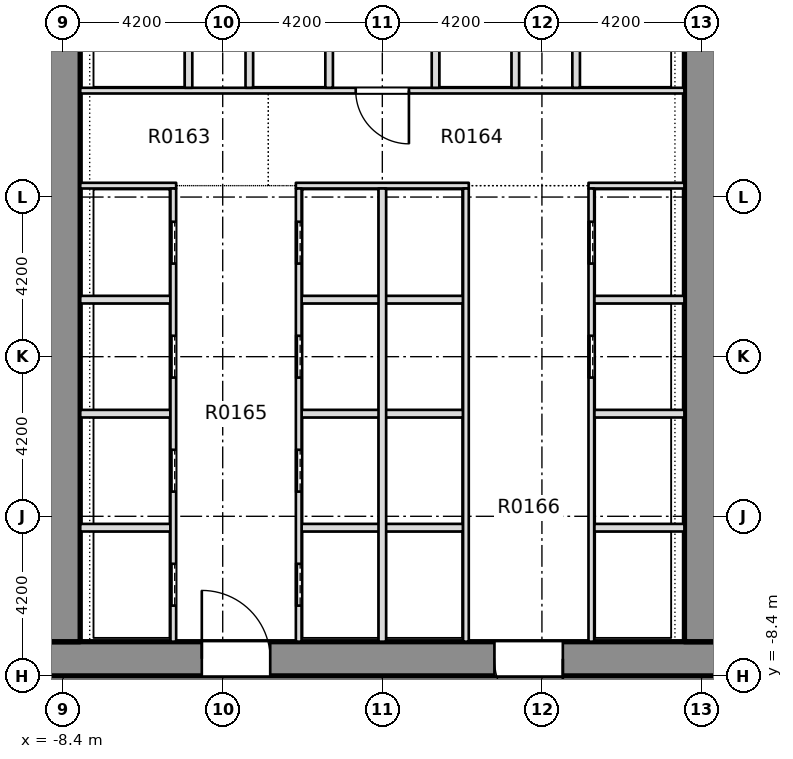
"""IFC4 building model, lengths in metres.
Left out: names, types, materials, properties, quantities, classifications, styles, units other than length and angle.
Written with IfcOpenShell. Run it as: python <this file> out.ifc"""

import sys

from ifc_helpers import new_model, si_unit, direction, frame, frame_2d, origin, place, context, subcontext, project, spatial, rectangle, extrude, element, fill, save


model = new_model("IFC4")
c1 = context("Model", 3, precision=1e-05, world=origin(), true_north=direction((0.0, 1.0)))
c2 = subcontext(c1, "Body", "Model", "MODEL_VIEW")
j1 = project(units=[si_unit("LENGTHUNIT", "METRE"), si_unit("PLANEANGLEUNIT", "RADIAN")], contexts=[c1])
p1 = place(None, origin())
s1 = spatial("IfcSite", under=j1, at=p1, CompositionType="ELEMENT")
p2 = place(p1, origin())
s2 = spatial("IfcBuilding", under=s1, at=p2, CompositionType="ELEMENT")
p3 = place(p2, frame((0.0, 0.0, 7.5)))
s3 = spatial("IfcBuildingStorey", under=s2, at=p3, CompositionType="ELEMENT", Elevation=7.5)
p4 = place(p3, frame((-11.7, -7.95, -0.4), z_axis=(0.0, 0.0, 1.0), x_axis=(1.0, 0.0, 0.0)))
e1 = element("IfcWall", 1, at=p4, inside=s3, PredefinedType="SHEAR", context=c2, shape_type="SweptSolid", body=[
    extrude(rectangle(XDim=23.4, YDim=0.9, at=frame_2d((11.7, 0.0))), origin(), (0.0, 0.0, 1.0), 5.0),
])
p5 = place(p4, frame((6.95, 0.0, 0.4)))
e2 = element("IfcOpeningElement", 2, at=p5, cuts=e1, PredefinedType="OPENING", context=c2, shape_type="SweptSolid", body=[
    extrude(rectangle(XDim=1.8, YDim=2.1, at=frame_2d((0.9, 1.05))), frame((0.0, 0.46, 0.0), z_axis=(0.0, -1.0, 0.0), x_axis=(1.0, 0.0, 0.0)), (0.0, 0.0, 1.0), 0.92),
])
p6 = place(p4, frame((14.65, 0.0, 0.4)))
e3 = element("IfcOpeningElement", 3, at=p6, cuts=e1, PredefinedType="OPENING", context=c2, shape_type="SweptSolid", body=[
    extrude(rectangle(XDim=1.8, YDim=2.1, at=frame_2d((0.9, 1.05))), frame((0.0, 0.46, 0.0), z_axis=(0.0, -1.0, 0.0), x_axis=(1.0, 0.0, 0.0)), (0.0, 0.0, 1.0), 0.92),
])
p7 = place(p3, frame((-8.4, -7.5, -0.4), z_axis=(0.0, 0.0, 1.0), x_axis=(0.0, 1.0, 0.0)))
e4 = element("IfcWall", 4, at=p7, inside=s3, PredefinedType="SHEAR", context=c2, shape_type="SweptSolid", body=[
    extrude(rectangle(XDim=28.35, YDim=0.9, at=frame_2d((14.175, 0.0))), origin(), (0.0, 0.0, 1.0), 5.0),
])
p8 = place(p7, frame((18.4, 0.0, 0.4)))
e5 = element("IfcOpeningElement", 5, at=p8, cuts=e4, PredefinedType="OPENING", context=c2, shape_type="SweptSolid", body=[
    extrude(rectangle(XDim=1.2, YDim=2.1, at=frame_2d((0.6, 1.05))), frame((0.0, 0.46, 0.0), z_axis=(0.0, -1.0, 0.0), x_axis=(1.0, 0.0, 0.0)), (0.0, 0.0, 1.0), 0.92),
])
p9 = place(p3, frame((8.4, -7.5, -0.4), z_axis=(0.0, 0.0, 1.0), x_axis=(0.0, 1.0, 0.0)))
e6 = element("IfcWall", 6, at=p9, inside=s3, PredefinedType="SHEAR", context=c2, shape_type="SweptSolid", body=[
    extrude(rectangle(XDim=28.35, YDim=0.9, at=frame_2d((14.175, 0.0))), origin(), (0.0, 0.0, 1.0), 5.0),
])
p10 = place(p9, frame((18.4, 0.0, 0.4)))
e7 = element("IfcOpeningElement", 7, at=p10, cuts=e6, PredefinedType="OPENING", context=c2, shape_type="SweptSolid", body=[
    extrude(rectangle(XDim=1.2, YDim=2.1, at=frame_2d((0.6, 1.05))), frame((0.0, 0.46, 0.0), z_axis=(0.0, -1.0, 0.0), x_axis=(1.0, 0.0, 0.0)), (0.0, 0.0, 1.0), 0.92),
])
p11 = place(p3, frame((-7.949, -4.5, 0.0), z_axis=(0.0, 0.0, 1.0), x_axis=(1.0, 0.0, 0.0)))
e8 = element("IfcWall", 8, at=p11, inside=s3, PredefinedType="PARTITIONING", context=c2, shape_type="SweptSolid", body=[
    extrude(rectangle(XDim=2.374, YDim=0.2, at=frame_2d((1.187, 0.0))), origin(), (0.0, 0.0, 1.0), 4.6),
])
p12 = place(p3, frame((-2.125, -4.5, 0.0), z_axis=(0.0, 0.0, 1.0), x_axis=(1.0, 0.0, 0.0)))
e9 = element("IfcWall", 9, at=p12, inside=s3, PredefinedType="PARTITIONING", context=c2, shape_type="SweptSolid", body=[
    extrude(rectangle(XDim=4.25, YDim=0.2, at=frame_2d((2.125, 0.0))), origin(), (0.0, 0.0, 1.0), 4.6),
])
for number, where, z_axis, x_axis in (
    (10, (5.575, -4.5, 0.0), (0.0, 0.0, 1.0), (1.0, 0.0, 0.0)),
    (11, (-7.949, -1.5, 0.0), (0.0, 0.0, 1.0), (1.0, 0.0, 0.0)),
):
    element("IfcWall", number, at=place(p3, frame(where, z_axis=z_axis, x_axis=x_axis)), inside=s3, PredefinedType="PARTITIONING", context=c2, shape_type="SweptSolid", body=[
        extrude(rectangle(XDim=2.374, YDim=0.2, at=frame_2d((1.187, 0.0))), origin(), (0.0, 0.0, 1.0), 4.6),
    ])
p13 = place(p3, frame((-2.125, -1.5, 0.0), z_axis=(0.0, 0.0, 1.0), x_axis=(1.0, 0.0, 0.0)))
e12 = element("IfcWall", 12, at=p13, inside=s3, PredefinedType="PARTITIONING", context=c2, shape_type="SweptSolid", body=[
    extrude(rectangle(XDim=4.25, YDim=0.2, at=frame_2d((2.125, 0.0))), origin(), (0.0, 0.0, 1.0), 4.6),
])
for number, where, z_axis, x_axis in (
    (13, (5.575, -1.5, 0.0), (0.0, 0.0, 1.0), (1.0, 0.0, 0.0)),
    (14, (-7.949, 1.5, 0.0), (0.0, 0.0, 1.0), (1.0, 0.0, 0.0)),
):
    element("IfcWall", number, at=place(p3, frame(where, z_axis=z_axis, x_axis=x_axis)), inside=s3, PredefinedType="PARTITIONING", context=c2, shape_type="SweptSolid", body=[
        extrude(rectangle(XDim=2.374, YDim=0.2, at=frame_2d((1.187, 0.0))), origin(), (0.0, 0.0, 1.0), 4.6),
    ])
p14 = place(p3, frame((-2.125, 1.5, 0.0), z_axis=(0.0, 0.0, 1.0), x_axis=(1.0, 0.0, 0.0)))
e15 = element("IfcWall", 15, at=p14, inside=s3, PredefinedType="PARTITIONING", context=c2, shape_type="SweptSolid", body=[
    extrude(rectangle(XDim=4.25, YDim=0.2, at=frame_2d((2.125, 0.0))), origin(), (0.0, 0.0, 1.0), 4.6),
])
p15 = place(p3, frame((5.575, 1.5, 0.0), z_axis=(0.0, 0.0, 1.0), x_axis=(1.0, 0.0, 0.0)))
e16 = element("IfcWall", 16, at=p15, inside=s3, PredefinedType="PARTITIONING", context=c2, shape_type="SweptSolid", body=[
    extrude(rectangle(XDim=2.374, YDim=0.2, at=frame_2d((1.187, 0.0))), origin(), (0.0, 0.0, 1.0), 4.6),
])
p16 = place(p3, frame((-7.949, 4.5, 0.0), z_axis=(0.0, 0.0, 1.0), x_axis=(1.0, 0.0, 0.0)))
e17 = element("IfcWall", 17, at=p16, inside=s3, PredefinedType="PARTITIONING", context=c2, shape_type="SweptSolid", body=[
    extrude(rectangle(XDim=2.524, YDim=0.15, at=frame_2d((1.262, 0.0))), origin(), (0.0, 0.0, 1.0), 4.6),
])
p17 = place(p3, frame((-2.275, 4.5, 0.0), z_axis=(0.0, 0.0, 1.0), x_axis=(1.0, 0.0, 0.0)))
e18 = element("IfcWall", 18, at=p17, inside=s3, PredefinedType="PARTITIONING", context=c2, shape_type="SweptSolid", body=[
    extrude(rectangle(XDim=4.55, YDim=0.15, at=frame_2d((2.275, 0.0))), origin(), (0.0, 0.0, 1.0), 4.6),
])
p18 = place(p3, frame((5.425, 4.5, 0.0), z_axis=(0.0, 0.0, 1.0), x_axis=(1.0, 0.0, 0.0)))
e19 = element("IfcWall", 19, at=p18, inside=s3, PredefinedType="PARTITIONING", context=c2, shape_type="SweptSolid", body=[
    extrude(rectangle(XDim=2.524, YDim=0.15, at=frame_2d((1.262, 0.0))), origin(), (0.0, 0.0, 1.0), 4.6),
])
p19 = place(p3, frame((-7.949, 7.0, 0.0), z_axis=(0.0, 0.0, 1.0), x_axis=(1.0, 0.0, 0.0)))
e20 = element("IfcWall", 20, at=p19, inside=s3, PredefinedType="PARTITIONING", context=c2, shape_type="SweptSolid", body=[
    extrude(rectangle(XDim=15.898, YDim=0.15, at=frame_2d((7.949, 0.0))), origin(), (0.0, 0.0, 1.0), 4.6),
])
p20 = place(p19, frame((7.249, 0.0, 0.0)))
e21 = element("IfcOpeningElement", 21, at=p20, cuts=e20, PredefinedType="OPENING", context=c2, shape_type="SweptSolid", body=[
    extrude(rectangle(XDim=1.4, YDim=2.1, at=frame_2d((0.7, 1.05))), frame((0.0, 0.085, 0.0), z_axis=(0.0, -1.0, 0.0), x_axis=(1.0, 0.0, 0.0)), (0.0, 0.0, 1.0), 0.17),
])
p21 = place(p3, frame((-5.5, -7.499, 0.0), z_axis=(0.0, 0.0, 1.0), x_axis=(0.0, 1.0, 0.0)))
e22 = element("IfcWall", 22, at=p21, inside=s3, PredefinedType="PARTITIONING", context=c2, shape_type="SweptSolid", body=[
    extrude(rectangle(XDim=11.924, YDim=0.15, at=frame_2d((5.962, 0.0))), origin(), (0.0, 0.0, 1.0), 4.6),
])
p22 = place(p21, frame((0.949, 0.0, 0.0)))
e23 = element("IfcOpeningElement", 23, at=p22, cuts=e22, PredefinedType="OPENING", context=c2, shape_type="SweptSolid", body=[
    extrude(rectangle(XDim=1.1, YDim=2.1, at=frame_2d((0.55, 1.05))), frame((0.0, 0.085, 0.0), z_axis=(0.0, -1.0, 0.0), x_axis=(1.0, 0.0, 0.0)), (0.0, 0.0, 1.0), 0.17),
])
p23 = place(p21, frame((3.949, 0.0, 0.0)))
e24 = element("IfcOpeningElement", 24, at=p23, cuts=e22, PredefinedType="OPENING", context=c2, shape_type="SweptSolid", body=[
    extrude(rectangle(XDim=1.1, YDim=2.1, at=frame_2d((0.55, 1.05))), frame((0.0, 0.085, 0.0), z_axis=(0.0, -1.0, 0.0), x_axis=(1.0, 0.0, 0.0)), (0.0, 0.0, 1.0), 0.17),
])
p24 = place(p21, frame((6.949, 0.0, 0.0)))
e25 = element("IfcOpeningElement", 25, at=p24, cuts=e22, PredefinedType="OPENING", context=c2, shape_type="SweptSolid", body=[
    extrude(rectangle(XDim=1.1, YDim=2.1, at=frame_2d((0.55, 1.05))), frame((0.0, 0.085, 0.0), z_axis=(0.0, -1.0, 0.0), x_axis=(1.0, 0.0, 0.0)), (0.0, 0.0, 1.0), 0.17),
])
p25 = place(p21, frame((9.949, 0.0, 0.0)))
e26 = element("IfcOpeningElement", 26, at=p25, cuts=e22, PredefinedType="OPENING", context=c2, shape_type="SweptSolid", body=[
    extrude(rectangle(XDim=1.1, YDim=2.1, at=frame_2d((0.55, 1.05))), frame((0.0, 0.085, 0.0), z_axis=(0.0, -1.0, 0.0), x_axis=(1.0, 0.0, 0.0)), (0.0, 0.0, 1.0), 0.17),
])
p26 = place(p3, frame((-5.1, 7.075, 0.0), z_axis=(0.0, 0.0, 1.0), x_axis=(0.0, 1.0, 0.0)))
e27 = element("IfcWall", 27, at=p26, inside=s3, PredefinedType="PARTITIONING", context=c2, shape_type="SweptSolid", body=[
    extrude(rectangle(XDim=2.725, YDim=0.2, at=frame_2d((1.363, 0.0))), origin(), (0.0, 0.0, 1.0), 4.6),
])
p27 = place(p3, frame((-3.5, 7.075, 0.0), z_axis=(0.0, 0.0, 1.0), x_axis=(0.0, 1.0, 0.0)))
e28 = element("IfcWall", 28, at=p27, inside=s3, PredefinedType="PARTITIONING", context=c2, shape_type="SweptSolid", body=[
    extrude(rectangle(XDim=2.85, YDim=0.2, at=frame_2d((1.425, 0.0))), origin(), (0.0, 0.0, 1.0), 4.6),
])
p28 = place(p3, frame((-2.2, -7.499, 0.0), z_axis=(0.0, 0.0, 1.0), x_axis=(0.0, 1.0, 0.0)))
e29 = element("IfcWall", 29, at=p28, inside=s3, PredefinedType="PARTITIONING", context=c2, shape_type="SweptSolid", body=[
    extrude(rectangle(XDim=11.924, YDim=0.15, at=frame_2d((5.962, 0.0))), origin(), (0.0, 0.0, 1.0), 4.6),
])
p29 = place(p28, frame((0.949, 0.0, 0.0)))
e30 = element("IfcOpeningElement", 30, at=p29, cuts=e29, PredefinedType="OPENING", context=c2, shape_type="SweptSolid", body=[
    extrude(rectangle(XDim=1.1, YDim=2.1, at=frame_2d((0.55, 1.05))), frame((0.0, 0.085, 0.0), z_axis=(0.0, -1.0, 0.0), x_axis=(1.0, 0.0, 0.0)), (0.0, 0.0, 1.0), 0.17),
])
p30 = place(p28, frame((3.949, 0.0, 0.0)))
e31 = element("IfcOpeningElement", 31, at=p30, cuts=e29, PredefinedType="OPENING", context=c2, shape_type="SweptSolid", body=[
    extrude(rectangle(XDim=1.1, YDim=2.1, at=frame_2d((0.55, 1.05))), frame((0.0, 0.085, 0.0), z_axis=(0.0, -1.0, 0.0), x_axis=(1.0, 0.0, 0.0)), (0.0, 0.0, 1.0), 0.17),
])
p31 = place(p28, frame((6.949, 0.0, 0.0)))
e32 = element("IfcOpeningElement", 32, at=p31, cuts=e29, PredefinedType="OPENING", context=c2, shape_type="SweptSolid", body=[
    extrude(rectangle(XDim=1.1, YDim=2.1, at=frame_2d((0.55, 1.05))), frame((0.0, 0.085, 0.0), z_axis=(0.0, -1.0, 0.0), x_axis=(1.0, 0.0, 0.0)), (0.0, 0.0, 1.0), 0.17),
])
p32 = place(p28, frame((9.949, 0.0, 0.0)))
e33 = element("IfcOpeningElement", 33, at=p32, cuts=e29, PredefinedType="OPENING", context=c2, shape_type="SweptSolid", body=[
    extrude(rectangle(XDim=1.1, YDim=2.1, at=frame_2d((0.55, 1.05))), frame((0.0, 0.085, 0.0), z_axis=(0.0, -1.0, 0.0), x_axis=(1.0, 0.0, 0.0)), (0.0, 0.0, 1.0), 0.17),
])
p33 = place(p3, frame((-1.4, 7.075, 0.0), z_axis=(0.0, 0.0, 1.0), x_axis=(0.0, 1.0, 0.0)))
e34 = element("IfcWall", 34, at=p33, inside=s3, PredefinedType="PARTITIONING", context=c2, shape_type="SweptSolid", body=[
    extrude(rectangle(XDim=2.85, YDim=0.2, at=frame_2d((1.425, 0.0))), origin(), (0.0, 0.0, 1.0), 4.6),
])
p34 = place(p3, frame((0.0, -7.499, 0.0), z_axis=(0.0, 0.0, 1.0), x_axis=(0.0, 1.0, 0.0)))
e35 = element("IfcWall", 35, at=p34, inside=s3, PredefinedType="PARTITIONING", context=c2, shape_type="SweptSolid", body=[
    extrude(rectangle(XDim=11.924, YDim=0.2, at=frame_2d((5.962, 0.0))), origin(), (0.0, 0.0, 1.0), 4.6),
])
p35 = place(p3, frame((1.4, 7.075, 0.0), z_axis=(0.0, 0.0, 1.0), x_axis=(0.0, 1.0, 0.0)))
e36 = element("IfcWall", 36, at=p35, inside=s3, PredefinedType="PARTITIONING", context=c2, shape_type="SweptSolid", body=[
    extrude(rectangle(XDim=2.85, YDim=0.2, at=frame_2d((1.425, 0.0))), origin(), (0.0, 0.0, 1.0), 4.6),
])
p36 = place(p3, frame((2.2, -7.499, 0.0), z_axis=(0.0, 0.0, 1.0), x_axis=(0.0, 1.0, 0.0)))
e37 = element("IfcWall", 37, at=p36, inside=s3, PredefinedType="PARTITIONING", context=c2, shape_type="SweptSolid", body=[
    extrude(rectangle(XDim=11.924, YDim=0.15, at=frame_2d((5.962, 0.0))), origin(), (0.0, 0.0, 1.0), 4.6),
])
p37 = place(p3, frame((3.5, 7.075, 0.0), z_axis=(0.0, 0.0, 1.0), x_axis=(0.0, 1.0, 0.0)))
e38 = element("IfcWall", 38, at=p37, inside=s3, PredefinedType="PARTITIONING", context=c2, shape_type="SweptSolid", body=[
    extrude(rectangle(XDim=2.85, YDim=0.2, at=frame_2d((1.425, 0.0))), origin(), (0.0, 0.0, 1.0), 4.6),
])
p38 = place(p3, frame((5.1, 7.075, 0.0), z_axis=(0.0, 0.0, 1.0), x_axis=(0.0, 1.0, 0.0)))
e39 = element("IfcWall", 39, at=p38, inside=s3, PredefinedType="PARTITIONING", context=c2, shape_type="SweptSolid", body=[
    extrude(rectangle(XDim=2.725, YDim=0.2, at=frame_2d((1.363, 0.0))), origin(), (0.0, 0.0, 1.0), 4.6),
])
p39 = place(p3, frame((5.5, -7.499, 0.0), z_axis=(0.0, 0.0, 1.0), x_axis=(0.0, 1.0, 0.0)))
e40 = element("IfcWall", 40, at=p39, inside=s3, PredefinedType="PARTITIONING", context=c2, shape_type="SweptSolid", body=[
    extrude(rectangle(XDim=11.924, YDim=0.15, at=frame_2d((5.962, 0.0))), origin(), (0.0, 0.0, 1.0), 4.6),
])
p40 = place(p39, frame((6.949, 0.0, 0.0)))
e41 = element("IfcOpeningElement", 41, at=p40, cuts=e40, PredefinedType="OPENING", context=c2, shape_type="SweptSolid", body=[
    extrude(rectangle(XDim=1.1, YDim=2.1, at=frame_2d((0.55, 1.05))), frame((0.0, 0.085, 0.0), z_axis=(0.0, -1.0, 0.0), x_axis=(1.0, 0.0, 0.0)), (0.0, 0.0, 1.0), 0.17),
])
p41 = place(p39, frame((9.949, 0.0, 0.0)))
e42 = element("IfcOpeningElement", 42, at=p41, cuts=e40, PredefinedType="OPENING", context=c2, shape_type="SweptSolid", body=[
    extrude(rectangle(XDim=1.1, YDim=2.1, at=frame_2d((0.55, 1.05))), frame((0.0, 0.085, 0.0), z_axis=(0.0, -1.0, 0.0), x_axis=(1.0, 0.0, 0.0)), (0.0, 0.0, 1.0), 0.17),
])
p42 = place(p22, origin())
e43 = element("IfcDoor", 43, at=p42, inside=s3, OperationType="SLIDING_TO_RIGHT", PredefinedType="DOOR", context=c2, shape_type="SweptSolid", body=[
    extrude(rectangle(XDim=1.1, YDim=2.1, at=frame_2d((0.55, 1.05))), frame((0.0, 0.025, 0.0), z_axis=(0.0, -1.0, 0.0), x_axis=(1.0, 0.0, 0.0)), (0.0, 0.0, 1.0), 0.05),
])
fill(e23, e43)
p43 = place(p23, origin())
e44 = element("IfcDoor", 44, at=p43, inside=s3, OperationType="SLIDING_TO_RIGHT", PredefinedType="DOOR", context=c2, shape_type="SweptSolid", body=[
    extrude(rectangle(XDim=1.1, YDim=2.1, at=frame_2d((0.55, 1.05))), frame((0.0, 0.025, 0.0), z_axis=(0.0, -1.0, 0.0), x_axis=(1.0, 0.0, 0.0)), (0.0, 0.0, 1.0), 0.05),
])
fill(e24, e44)
p44 = place(p24, origin())
e45 = element("IfcDoor", 45, at=p44, inside=s3, OperationType="SLIDING_TO_RIGHT", PredefinedType="DOOR", context=c2, shape_type="SweptSolid", body=[
    extrude(rectangle(XDim=1.1, YDim=2.1, at=frame_2d((0.55, 1.05))), frame((0.0, 0.025, 0.0), z_axis=(0.0, -1.0, 0.0), x_axis=(1.0, 0.0, 0.0)), (0.0, 0.0, 1.0), 0.05),
])
fill(e25, e45)
p45 = place(p25, origin())
e46 = element("IfcDoor", 46, at=p45, inside=s3, OperationType="SLIDING_TO_RIGHT", PredefinedType="DOOR", context=c2, shape_type="SweptSolid", body=[
    extrude(rectangle(XDim=1.1, YDim=2.1, at=frame_2d((0.55, 1.05))), frame((0.0, 0.025, 0.0), z_axis=(0.0, -1.0, 0.0), x_axis=(1.0, 0.0, 0.0)), (0.0, 0.0, 1.0), 0.05),
])
fill(e26, e46)
p46 = place(p29, origin())
e47 = element("IfcDoor", 47, at=p46, inside=s3, OperationType="SLIDING_TO_RIGHT", PredefinedType="DOOR", context=c2, shape_type="SweptSolid", body=[
    extrude(rectangle(XDim=1.1, YDim=2.1, at=frame_2d((0.55, 1.05))), frame((0.0, 0.025, 0.0), z_axis=(0.0, -1.0, 0.0), x_axis=(1.0, 0.0, 0.0)), (0.0, 0.0, 1.0), 0.05),
])
fill(e30, e47)
p47 = place(p30, origin())
e48 = element("IfcDoor", 48, at=p47, inside=s3, OperationType="SLIDING_TO_RIGHT", PredefinedType="DOOR", context=c2, shape_type="SweptSolid", body=[
    extrude(rectangle(XDim=1.1, YDim=2.1, at=frame_2d((0.55, 1.05))), frame((0.0, 0.025, 0.0), z_axis=(0.0, -1.0, 0.0), x_axis=(1.0, 0.0, 0.0)), (0.0, 0.0, 1.0), 0.05),
])
fill(e31, e48)
p48 = place(p31, origin())
e49 = element("IfcDoor", 49, at=p48, inside=s3, OperationType="SLIDING_TO_RIGHT", PredefinedType="DOOR", context=c2, shape_type="SweptSolid", body=[
    extrude(rectangle(XDim=1.1, YDim=2.1, at=frame_2d((0.55, 1.05))), frame((0.0, 0.025, 0.0), z_axis=(0.0, -1.0, 0.0), x_axis=(1.0, 0.0, 0.0)), (0.0, 0.0, 1.0), 0.05),
])
fill(e32, e49)
p49 = place(p32, origin())
e50 = element("IfcDoor", 50, at=p49, inside=s3, OperationType="SLIDING_TO_RIGHT", PredefinedType="DOOR", context=c2, shape_type="SweptSolid", body=[
    extrude(rectangle(XDim=1.1, YDim=2.1, at=frame_2d((0.55, 1.05))), frame((0.0, 0.025, 0.0), z_axis=(0.0, -1.0, 0.0), x_axis=(1.0, 0.0, 0.0)), (0.0, 0.0, 1.0), 0.05),
])
fill(e33, e50)
p50 = place(p40, origin())
e51 = element("IfcDoor", 51, at=p50, inside=s3, OperationType="SLIDING_TO_RIGHT", PredefinedType="DOOR", context=c2, shape_type="SweptSolid", body=[
    extrude(rectangle(XDim=1.1, YDim=2.1, at=frame_2d((0.55, 1.05))), frame((0.0, 0.025, 0.0), z_axis=(0.0, -1.0, 0.0), x_axis=(1.0, 0.0, 0.0)), (0.0, 0.0, 1.0), 0.05),
])
fill(e41, e51)
p51 = place(p41, origin())
e52 = element("IfcDoor", 52, at=p51, inside=s3, OperationType="SLIDING_TO_RIGHT", PredefinedType="DOOR", context=c2, shape_type="SweptSolid", body=[
    extrude(rectangle(XDim=1.1, YDim=2.1, at=frame_2d((0.55, 1.05))), frame((0.0, 0.025, 0.0), z_axis=(0.0, -1.0, 0.0), x_axis=(1.0, 0.0, 0.0)), (0.0, 0.0, 1.0), 0.05),
])
fill(e42, e52)
p52 = place(p20, origin())
e53 = element("IfcDoor", 53, at=p52, inside=s3, OperationType="SINGLE_SWING_RIGHT", PredefinedType="DOOR", context=c2, shape_type="SweptSolid", body=[
    extrude(rectangle(XDim=1.4, YDim=2.1, at=frame_2d((0.7, 1.05))), frame((0.0, 0.025, 0.0), z_axis=(0.0, -1.0, 0.0), x_axis=(1.0, 0.0, 0.0)), (0.0, 0.0, 1.0), 0.05),
])
fill(e21, e53)
p53 = place(p5, origin())
e54 = element("IfcDoor", 54, at=p53, inside=s3, OperationType="SINGLE_SWING_LEFT", PredefinedType="DOOR", context=c2, shape_type="SweptSolid", body=[
    extrude(rectangle(XDim=1.8, YDim=2.1, at=frame_2d((0.9, 1.05))), frame((0.0, 0.025, 0.0), z_axis=(0.0, -1.0, 0.0), x_axis=(1.0, 0.0, 0.0)), (0.0, 0.0, 1.0), 0.05),
])
fill(e2, e54)
p54 = place(p6, origin())
e55 = element("IfcDoor", 55, at=p54, inside=s3, OperationType="SINGLE_SWING_LEFT", PredefinedType="DOOR", context=c2, shape_type="SweptSolid", body=[
    extrude(rectangle(XDim=1.8, YDim=2.1, at=frame_2d((0.9, 1.05))), frame((0.0, 0.025, 0.0), z_axis=(0.0, -1.0, 0.0), x_axis=(1.0, 0.0, 0.0)), (0.0, 0.0, 1.0), 0.05),
])
fill(e3, e55)
save(model, sys.argv[1])
